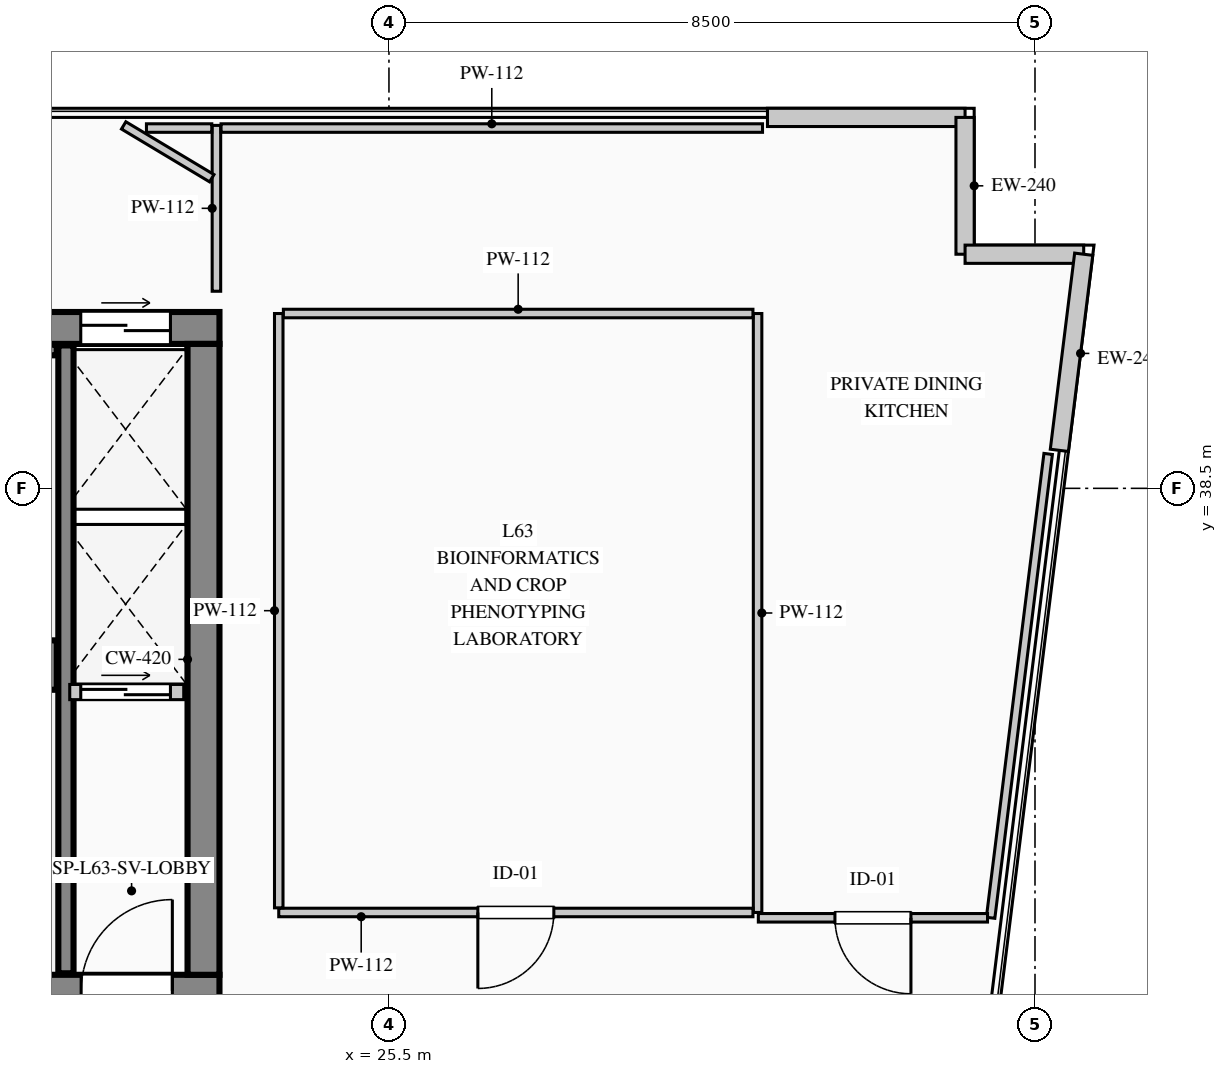
"""IFC4 building model, lengths in metres.
Left out: names, types, materials, properties, quantities, classifications, styles, units other than length and angle.
Written with IfcOpenShell. Run it as: python <this file> out.ifc"""

import sys

from ifc_helpers import new_model, si_unit, direction, frame, frame_2d, origin, place, context, subcontext, project, spatial, rectangle, extrude, element, fill, save


model = new_model("IFC4")
c1 = context("Model", 3, precision=1e-05, world=origin(), true_north=direction((0.0, 1.0)))
c2 = subcontext(c1, "Body", "Model", "MODEL_VIEW")
j1 = project(units=[si_unit("LENGTHUNIT", "METRE"), si_unit("PLANEANGLEUNIT", "RADIAN")], contexts=[c1])
p1 = place(None, origin())
s1 = spatial("IfcSite", under=j1, at=p1, CompositionType="ELEMENT")
p2 = place(p1, origin())
s2 = spatial("IfcBuilding", under=s1, at=p2, CompositionType="ELEMENT")
p3 = place(p2, frame((0.0, 0.0, 264.6)))
s3 = spatial("IfcBuildingStorey", under=s2, at=p3, CompositionType="ELEMENT", Elevation=264.6)
p4 = place(p3, frame((5.58, 40.61, 0.0), z_axis=(0.0, 0.0, 1.0), x_axis=(1.0, 0.0, 0.0)))
e1 = element("IfcWall", 1, at=p4, inside=s3, PredefinedType="SHEAR", context=c2, shape_type="SweptSolid", body=[
    extrude(rectangle(XDim=17.69, YDim=0.42, at=frame_2d((8.845, 0.0))), origin(), (0.0, 0.0, 1.0), 3.95),
])
p5 = place(p4, frame((15.865, 0.0, 0.0)))
e2 = element("IfcOpeningElement", 2, at=p5, cuts=e1, PredefinedType="OPENING", context=c2, shape_type="SweptSolid", body=[
    extrude(rectangle(XDim=1.18, YDim=2.25, at=frame_2d((0.59, 1.125))), frame((0.0, 0.22, 0.0), z_axis=(0.0, -1.0, 0.0), x_axis=(1.0, 0.0, 0.0)), (0.0, 0.0, 1.0), 0.44),
])
p6 = place(p3, frame((5.58, 31.89, 0.0), z_axis=(0.0, 0.0, 1.0), x_axis=(1.0, 0.0, 0.0)))
e3 = element("IfcWall", 3, at=p6, inside=s3, PredefinedType="SHEAR", context=c2, shape_type="SweptSolid", body=[
    extrude(rectangle(XDim=17.69, YDim=0.42, at=frame_2d((8.845, 0.0))), origin(), (0.0, 0.0, 1.0), 3.95),
])
p7 = place(p6, frame((3.07, 0.0, 0.0)))
e4 = element("IfcOpeningElement", 4, at=p7, cuts=e3, PredefinedType="OPENING", context=c2, shape_type="SweptSolid", body=[
    extrude(rectangle(XDim=1.2, YDim=2.2, at=frame_2d((0.6, 1.1))), frame((0.0, 0.22, 0.0), z_axis=(0.0, -1.0, 0.0), x_axis=(1.0, 0.0, 0.0)), (0.0, 0.0, 1.0), 0.44),
])
p8 = place(p6, frame((6.92, 0.0, 0.0)))
e5 = element("IfcOpeningElement", 5, at=p8, cuts=e3, PredefinedType="OPENING", context=c2, shape_type="SweptSolid", body=[
    extrude(rectangle(XDim=1.2, YDim=2.2, at=frame_2d((0.6, 1.1))), frame((0.0, 0.22, 0.0), z_axis=(0.0, -1.0, 0.0), x_axis=(1.0, 0.0, 0.0)), (0.0, 0.0, 1.0), 0.44),
])
p9 = place(p6, frame((8.77, 0.0, 0.0)))
e6 = element("IfcOpeningElement", 6, at=p9, cuts=e3, PredefinedType="OPENING", context=c2, shape_type="SweptSolid", body=[
    extrude(rectangle(XDim=1.15, YDim=2.2, at=frame_2d((0.575, 1.1))), frame((0.0, 0.22, 0.0), z_axis=(0.0, -1.0, 0.0), x_axis=(1.0, 0.0, 0.0)), (0.0, 0.0, 1.0), 0.44),
])
p10 = place(p6, frame((15.87, 0.0, 0.0)))
e7 = element("IfcOpeningElement", 7, at=p10, cuts=e3, PredefinedType="OPENING", context=c2, shape_type="SweptSolid", body=[
    extrude(rectangle(XDim=1.2, YDim=2.2, at=frame_2d((0.6, 1.1))), frame((0.0, 0.22, 0.0), z_axis=(0.0, -1.0, 0.0), x_axis=(1.0, 0.0, 0.0)), (0.0, 0.0, 1.0), 0.44),
])
p11 = place(p3, frame((23.06, 32.1, 0.0), z_axis=(0.0, 0.0, 1.0), x_axis=(0.0, 1.0, 0.0)))
e8 = element("IfcWall", 8, at=p11, inside=s3, PredefinedType="SHEAR", context=c2, shape_type="SweptSolid", body=[
    extrude(rectangle(XDim=8.3, YDim=0.42, at=frame_2d((4.15, 0.0))), origin(), (0.0, 0.0, 1.0), 3.95),
])
p12 = place(p3, frame((14.12, 36.175, 0.0), z_axis=(0.0, 0.0, 1.0), x_axis=(1.0, 0.0, 0.0)))
e9 = element("IfcWall", 9, at=p12, inside=s3, PredefinedType="SHEAR", context=c2, shape_type="SweptSolid", body=[
    extrude(rectangle(XDim=7.01, YDim=0.65, at=frame_2d((3.505, 0.0))), origin(), (0.0, 0.0, 1.0), 3.95),
])
p13 = place(p3, frame((21.25, 32.12, 0.0), z_axis=(0.0, 0.0, 1.0), x_axis=(0.0, 1.0, 0.0)))
e10 = element("IfcWall", 10, at=p13, inside=s3, PredefinedType="SHEAR", context=c2, shape_type="SweptSolid", body=[
    extrude(rectangle(XDim=8.26, YDim=0.2, at=frame_2d((4.13, 0.0))), origin(), (0.0, 0.0, 1.0), 3.95),
])
p14 = place(p3, frame((14.12, 40.32, 0.0), z_axis=(0.0, 0.0, 1.0), x_axis=(1.0, 0.0, 0.0)))
e11 = element("IfcWall", 11, at=p14, inside=s3, PredefinedType="SHEAR", context=c2, shape_type="SweptSolid", body=[
    extrude(rectangle(XDim=7.01, YDim=0.14, at=frame_2d((3.505, 0.0))), origin(), (0.0, 0.0, 1.0), 3.95),
])
p15 = place(p3, frame((30.48, 43.38, 0.0), z_axis=(0.0, 0.0, 1.0), x_axis=(1.0, 0.0, 0.0)))
e12 = element("IfcWall", 12, at=p15, inside=s3, PredefinedType="STANDARD", context=c2, shape_type="SweptSolid", body=[
    extrude(rectangle(XDim=2.6, YDim=0.24, at=frame_2d((1.3, 0.0))), origin(), (0.0, 0.0, 1.0), 3.7),
])
p16 = place(p3, frame((33.08, 43.38, 0.0), z_axis=(0.0, 0.0, 1.0), x_axis=(0.0, -1.0, 0.0)))
e13 = element("IfcWall", 13, at=p16, inside=s3, PredefinedType="STANDARD", context=c2, shape_type="SweptSolid", body=[
    extrude(rectangle(XDim=1.8, YDim=0.24, at=frame_2d((0.9, 0.0))), origin(), (0.0, 0.0, 1.0), 3.7),
])
p17 = place(p3, frame((33.08, 41.58, 0.0), z_axis=(0.0, 0.0, 1.0), x_axis=(1.0, 0.0, 0.0)))
e14 = element("IfcWall", 14, at=p17, inside=s3, PredefinedType="STANDARD", context=c2, shape_type="SweptSolid", body=[
    extrude(rectangle(XDim=1.561, YDim=0.24, at=frame_2d((0.78, 0.0))), origin(), (0.0, 0.0, 1.0), 3.7),
])
p18 = place(p3, frame((34.641, 41.58, 0.0), z_axis=(0.0, 0.0, 1.0), x_axis=(-0.123191073593, -0.992382970121, 0.0)))
e15 = element("IfcWall", 15, at=p18, inside=s3, PredefinedType="STANDARD", context=c2, shape_type="SweptSolid", body=[
    extrude(rectangle(XDim=2.6, YDim=0.24, at=frame_2d((1.3, 0.0))), origin(), (0.0, 0.0, 1.0), 3.7),
])
p19 = place(p3, frame((21.3, 35.82, 0.0), z_axis=(0.0, 0.0, 1.0), x_axis=(1.0, 0.0, 0.0)))
e16 = element("IfcWall", 16, at=p19, inside=s3, PredefinedType="PARTITIONING", context=c2, shape_type="SweptSolid", body=[
    extrude(rectangle(XDim=1.5, YDim=0.2, at=frame_2d((0.75, 0.0))), origin(), (0.0, 0.0, 1.0), 3.7),
])
p20 = place(p19, frame((0.145, 0.0, 0.0)))
e17 = element("IfcOpeningElement", 17, at=p20, cuts=e16, PredefinedType="OPENING", context=c2, shape_type="SweptSolid", body=[
    extrude(rectangle(XDim=1.18, YDim=2.25, at=frame_2d((0.59, 1.125))), frame((0.0, 0.11, 0.0), z_axis=(0.0, -1.0, 0.0), x_axis=(1.0, 0.0, 0.0)), (0.0, 0.0, 1.0), 0.22),
])
p21 = place(p3, frame((30.35, 40.8, 0.0), z_axis=(0.0, 0.0, 1.0), x_axis=(0.0, -1.0, 0.0)))
e18 = element("IfcWall", 18, at=p21, inside=s3, PredefinedType="PARTITIONING", context=c2, shape_type="SweptSolid", body=[
    extrude(rectangle(XDim=7.88, YDim=0.112, at=frame_2d((3.94, 0.0))), origin(), (0.0, 0.0, 1.0), 3.7),
])
p22 = place(p3, frame((30.289, 32.92, 0.0), z_axis=(0.0, 0.0, 1.0), x_axis=(-1.0, 0.0, 0.0)))
e19 = element("IfcWall", 19, at=p22, inside=s3, PredefinedType="PARTITIONING", context=c2, shape_type="SweptSolid", body=[
    extrude(rectangle(XDim=6.239, YDim=0.112, at=frame_2d((3.12, 0.0))), origin(), (0.0, 0.0, 1.0), 3.7),
])
p23 = place(p22, frame((2.619, 0.0, 0.0)))
e20 = element("IfcOpeningElement", 20, at=p23, cuts=e19, PredefinedType="OPENING", context=c2, shape_type="SweptSolid", body=[
    extrude(rectangle(XDim=1.0, YDim=2.15, at=frame_2d((0.5, 1.075))), frame((0.0, 0.066, 0.0), z_axis=(0.0, -1.0, 0.0), x_axis=(1.0, 0.0, 0.0)), (0.0, 0.0, 1.0), 0.132),
])
p24 = place(p3, frame((24.05, 32.981, 0.0), z_axis=(0.0, 0.0, 1.0), x_axis=(0.0, 1.0, 0.0)))
e21 = element("IfcWall", 21, at=p24, inside=s3, PredefinedType="PARTITIONING", context=c2, shape_type="SweptSolid", body=[
    extrude(rectangle(XDim=7.819, YDim=0.112, at=frame_2d((3.91, 0.0))), origin(), (0.0, 0.0, 1.0), 3.7),
])
p25 = place(p3, frame((24.111, 40.8, 0.0), z_axis=(0.0, 0.0, 1.0), x_axis=(1.0, 0.0, 0.0)))
e22 = element("IfcWall", 22, at=p25, inside=s3, PredefinedType="PARTITIONING", context=c2, shape_type="SweptSolid", body=[
    extrude(rectangle(XDim=6.178, YDim=0.112, at=frame_2d((3.089, 0.0))), origin(), (0.0, 0.0, 1.0), 3.7),
])
p26 = place(p3, frame((23.23, 41.093, 0.0), z_axis=(0.0, 0.0, 1.0), x_axis=(0.0, 1.0, 0.0)))
e23 = element("IfcWall", 23, at=p26, inside=s3, PredefinedType="PARTITIONING", context=c2, shape_type="SweptSolid", body=[
    extrude(rectangle(XDim=2.182, YDim=0.112, at=frame_2d((1.091, 0.0))), origin(), (0.0, 0.0, 1.0), 3.7),
])
p27 = place(p3, frame((23.169, 42.58, 0.0), z_axis=(0.0, 0.0, 1.0), x_axis=(-0.857763736618, 0.514044134431, 0.0)))
e24 = element("IfcWall", 24, at=p27, inside=s3, PredefinedType="PARTITIONING", context=c2, shape_type="SweptSolid", body=[
    extrude(rectangle(XDim=1.352, YDim=0.112, at=frame_2d((0.676, 0.0))), origin(), (0.0, 0.0, 1.0), 3.7),
])
p28 = place(p3, frame((22.309, 43.24, 0.0), z_axis=(0.0, 0.0, 1.0), x_axis=(1.0, 0.0, 0.0)))
e25 = element("IfcWall", 25, at=p28, inside=s3, PredefinedType="PARTITIONING", context=c2, shape_type="SweptSolid", body=[
    extrude(rectangle(XDim=0.86, YDim=0.112, at=frame_2d((0.43, 0.0))), origin(), (0.0, 0.0, 1.0), 3.7),
])
p29 = place(p3, frame((23.291, 43.24, 0.0), z_axis=(0.0, 0.0, 1.0), x_axis=(1.0, 0.0, 0.0)))
e26 = element("IfcWall", 26, at=p29, inside=s3, PredefinedType="PARTITIONING", context=c2, shape_type="SweptSolid", body=[
    extrude(rectangle(XDim=7.124, YDim=0.112, at=frame_2d((3.562, 0.0))), origin(), (0.0, 0.0, 1.0), 3.7),
])
p30 = place(p3, frame((34.173, 38.953, 0.0), z_axis=(0.0, 0.0, 1.0), x_axis=(-0.123155137196, -0.992387430484, 0.0)))
e27 = element("IfcWall", 27, at=p30, inside=s3, PredefinedType="PARTITIONING", context=c2, shape_type="SweptSolid", body=[
    extrude(rectangle(XDim=6.149, YDim=0.112, at=frame_2d((3.075, 0.0))), origin(), (0.0, 0.0, 1.0), 3.7),
])
p31 = place(p3, frame((33.375, 32.85, 0.0), z_axis=(0.0, 0.0, 1.0), x_axis=(-1.0, 0.0, 0.0)))
e28 = element("IfcWall", 28, at=p31, inside=s3, PredefinedType="PARTITIONING", context=c2, shape_type="SweptSolid", body=[
    extrude(rectangle(XDim=3.015, YDim=0.112, at=frame_2d((1.508, 0.0))), origin(), (0.0, 0.0, 1.0), 3.7),
])
p32 = place(p31, frame((1.008, 0.0, 0.0)))
e29 = element("IfcOpeningElement", 29, at=p32, cuts=e28, PredefinedType="OPENING", context=c2, shape_type="SweptSolid", body=[
    extrude(rectangle(XDim=1.0, YDim=2.15, at=frame_2d((0.5, 1.075))), frame((0.0, 0.066, 0.0), z_axis=(0.0, -1.0, 0.0), x_axis=(1.0, 0.0, 0.0)), (0.0, 0.0, 1.0), 0.132),
])
p33 = place(p10, origin())
e30 = element("IfcDoor", 30, at=p33, inside=s3, OperationType="SINGLE_SWING_RIGHT", PredefinedType="DOOR", context=c2, shape_type="SweptSolid", body=[
    extrude(rectangle(XDim=1.2, YDim=2.2, at=frame_2d((0.6, 1.1))), frame((0.0, 0.025, 0.0), z_axis=(0.0, -1.0, 0.0), x_axis=(1.0, 0.0, 0.0)), (0.0, 0.0, 1.0), 0.05),
])
fill(e7, e30)
p34 = place(p5, origin())
e31 = element("IfcDoor", 31, at=p34, inside=s3, OperationType="DOUBLE_DOOR_SLIDING", PredefinedType="DOOR", context=c2, shape_type="SweptSolid", body=[
    extrude(rectangle(XDim=1.18, YDim=2.25, at=frame_2d((0.59, 1.125))), frame((0.0, 0.025, 0.0), z_axis=(0.0, -1.0, 0.0), x_axis=(1.0, 0.0, 0.0)), (0.0, 0.0, 1.0), 0.05),
])
fill(e2, e31)
p35 = place(p20, origin())
e32 = element("IfcDoor", 32, at=p35, inside=s3, OperationType="DOUBLE_DOOR_SLIDING", PredefinedType="DOOR", context=c2, shape_type="SweptSolid", body=[
    extrude(rectangle(XDim=1.18, YDim=2.25, at=frame_2d((0.59, 1.125))), frame((0.0, 0.025, 0.0), z_axis=(0.0, -1.0, 0.0), x_axis=(1.0, 0.0, 0.0)), (0.0, 0.0, 1.0), 0.05),
])
fill(e17, e32)
p36 = place(p23, origin())
e33 = element("IfcDoor", 33, at=p36, inside=s3, OperationType="SINGLE_SWING_RIGHT", PredefinedType="DOOR", context=c2, shape_type="SweptSolid", body=[
    extrude(rectangle(XDim=1.0, YDim=2.15, at=frame_2d((0.5, 1.075))), frame((0.0, 0.025, 0.0), z_axis=(0.0, -1.0, 0.0), x_axis=(1.0, 0.0, 0.0)), (0.0, 0.0, 1.0), 0.05),
])
fill(e20, e33)
p37 = place(p32, origin())
e34 = element("IfcDoor", 34, at=p37, inside=s3, OperationType="SINGLE_SWING_LEFT", PredefinedType="DOOR", context=c2, shape_type="SweptSolid", body=[
    extrude(rectangle(XDim=1.0, YDim=2.15, at=frame_2d((0.5, 1.075))), frame((0.0, 0.025, 0.0), z_axis=(0.0, -1.0, 0.0), x_axis=(1.0, 0.0, 0.0)), (0.0, 0.0, 1.0), 0.05),
])
fill(e29, e34)
save(model, sys.argv[1])
